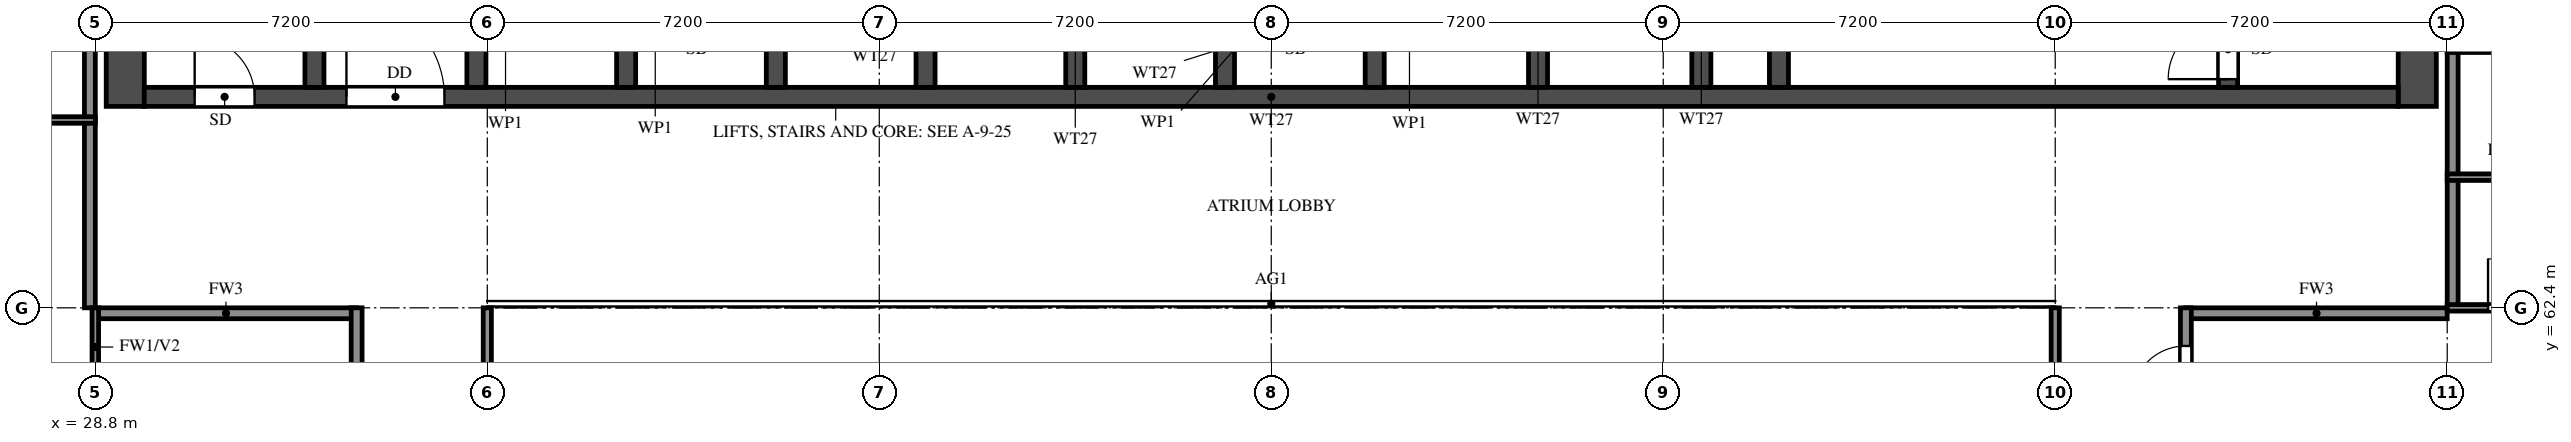
"""IFC4 building model, lengths in metres.
Left out: names, types, materials, properties, quantities, classifications, styles, units other than length and angle.
Written with IfcOpenShell. Run it as: python <this file> out.ifc"""

import sys

from ifc_helpers import new_model, si_unit, direction, frame, frame_2d, origin, place, context, subcontext, project, spatial, rectangle, extrude, element, fill, save


model = new_model("IFC4")
c1 = context("Model", 3, precision=1e-05, world=origin(), true_north=direction((0.0, 1.0)))
c2 = subcontext(c1, "Body", "Model", "MODEL_VIEW")
j1 = project(units=[si_unit("LENGTHUNIT", "METRE"), si_unit("PLANEANGLEUNIT", "RADIAN")], contexts=[c1])
p1 = place(None, origin())
s1 = spatial("IfcSite", under=j1, at=p1, CompositionType="ELEMENT")
p2 = place(p1, origin())
s2 = spatial("IfcBuilding", under=s1, at=p2, CompositionType="ELEMENT")
p3 = place(p2, frame((0.0, 0.0, 188.5)))
s3 = spatial("IfcBuildingStorey", under=s2, at=p3, CompositionType="ELEMENT", Elevation=188.5)
for number, where, z_axis, x_axis in (
    (1, (29.35, 66.1, 0.0), (0.0, 0.0, 1.0), (0.0, 1.0, 0.0)),
    (2, (71.45, 66.1, 0.0), (0.0, 0.0, 1.0), (0.0, 1.0, 0.0)),
):
    element("IfcWall", number, at=place(p3, frame(where, z_axis=z_axis, x_axis=x_axis)), inside=s3, PredefinedType="SHEAR", context=c2, shape_type="SweptSolid", body=[
        extrude(rectangle(XDim=11.9, YDim=0.7, at=frame_2d((5.95, 0.0))), origin(), (0.0, 0.0, 1.0), 3.2),
    ])
p4 = place(p3, frame((29.7, 66.275, 0.0), z_axis=(0.0, 0.0, 1.0), x_axis=(1.0, 0.0, 0.0)))
e3 = element("IfcWall", 3, at=p4, inside=s3, PredefinedType="SHEAR", context=c2, shape_type="SweptSolid", body=[
    extrude(rectangle(XDim=41.4, YDim=0.35, at=frame_2d((20.7, 0.0))), origin(), (0.0, 0.0, 1.0), 3.2),
])
p5 = place(p4, frame((0.925, 0.0, 0.0)))
e4 = element("IfcOpeningElement", 4, at=p5, cuts=e3, PredefinedType="OPENING", context=c2, shape_type="SweptSolid", body=[
    extrude(rectangle(XDim=1.1, YDim=2.1, at=frame_2d((0.55, 1.05))), frame((0.0, 0.185, 0.0), z_axis=(0.0, -1.0, 0.0), x_axis=(1.0, 0.0, 0.0)), (0.0, 0.0, 1.0), 0.37),
])
p6 = place(p4, frame((3.712, 0.0, 0.0)))
e5 = element("IfcOpeningElement", 5, at=p6, cuts=e3, PredefinedType="OPENING", context=c2, shape_type="SweptSolid", body=[
    extrude(rectangle(XDim=1.8, YDim=2.1, at=frame_2d((0.9, 1.05))), frame((0.0, 0.185, 0.0), z_axis=(0.0, -1.0, 0.0), x_axis=(1.0, 0.0, 0.0)), (0.0, 0.0, 1.0), 0.37),
])
p7 = place(p3, frame((32.825, 66.45, 0.0), z_axis=(0.0, 0.0, 1.0), x_axis=(0.0, 1.0, 0.0)))
e6 = element("IfcWall", 6, at=p7, inside=s3, PredefinedType="SHEAR", context=c2, shape_type="SweptSolid", body=[
    extrude(rectangle(XDim=10.85, YDim=0.35, at=frame_2d((5.425, 0.0))), origin(), (0.0, 0.0, 1.0), 3.2),
])
p8 = place(p3, frame((67.975, 66.45, 0.0), z_axis=(0.0, 0.0, 1.0), x_axis=(0.0, 1.0, 0.0)))
e7 = element("IfcWall", 7, at=p8, inside=s3, PredefinedType="SHEAR", context=c2, shape_type="SweptSolid", body=[
    extrude(rectangle(XDim=10.85, YDim=0.35, at=frame_2d((5.425, 0.0))), origin(), (0.0, 0.0, 1.0), 3.2),
])
p9 = place(p8, frame((0.15, 0.0, 0.0)))
e8 = element("IfcOpeningElement", 8, at=p9, cuts=e7, PredefinedType="OPENING", context=c2, shape_type="SweptSolid", body=[
    extrude(rectangle(XDim=1.1, YDim=2.1, at=frame_2d((0.55, 1.05))), frame((0.0, 0.185, 0.0), z_axis=(0.0, -1.0, 0.0), x_axis=(1.0, 0.0, 0.0)), (0.0, 0.0, 1.0), 0.37),
])
p10 = place(p3, frame((59.725, 66.45, 0.0), z_axis=(0.0, 0.0, 1.0), x_axis=(0.0, 1.0, 0.0)))
e9 = element("IfcWall", 9, at=p10, inside=s3, PredefinedType="SHEAR", context=c2, shape_type="SweptSolid", body=[
    extrude(rectangle(XDim=6.125, YDim=0.35, at=frame_2d((3.062, 0.0))), origin(), (0.0, 0.0, 1.0), 3.2),
])
p11 = place(p10, frame((3.85, 0.0, 0.0)))
e10 = element("IfcOpeningElement", 10, at=p11, cuts=e9, PredefinedType="OPENING", context=c2, shape_type="SweptSolid", body=[
    extrude(rectangle(XDim=1.2, YDim=2.1, at=frame_2d((0.6, 1.05))), frame((0.0, 0.185, 0.0), z_axis=(0.0, -1.0, 0.0), x_axis=(1.0, 0.0, 0.0)), (0.0, 0.0, 1.0), 0.37),
])
for number, where, z_axis, x_axis in (
    (11, (35.8, 66.45, 0.0), (0.0, 0.0, 1.0), (0.0, 1.0, 0.0)),
    (12, (38.55, 66.45, 0.0), (0.0, 0.0, 1.0), (0.0, 1.0, 0.0)),
    (13, (41.3, 66.45, 0.0), (0.0, 0.0, 1.0), (0.0, 1.0, 0.0)),
    (14, (44.05, 66.45, 0.0), (0.0, 0.0, 1.0), (0.0, 1.0, 0.0)),
    (15, (46.8, 66.45, 0.0), (0.0, 0.0, 1.0), (0.0, 1.0, 0.0)),
    (16, (49.55, 66.45, 0.0), (0.0, 0.0, 1.0), (0.0, 1.0, 0.0)),
    (17, (52.3, 66.45, 0.0), (0.0, 0.0, 1.0), (0.0, 1.0, 0.0)),
    (18, (55.3, 66.45, 0.0), (0.0, 0.0, 1.0), (0.0, 1.0, 0.0)),
    (19, (58.3, 66.45, 0.0), (0.0, 0.0, 1.0), (0.0, 1.0, 0.0)),
):
    element("IfcWall", number, at=place(p3, frame(where, z_axis=z_axis, x_axis=x_axis)), inside=s3, PredefinedType="SHEAR", context=c2, shape_type="SweptSolid", body=[
        extrude(rectangle(XDim=2.425, YDim=0.35, at=frame_2d((1.212, 0.0))), origin(), (0.0, 0.0, 1.0), 3.2),
    ])
for number, where, z_axis, x_axis in (
    (20, (28.8, 62.3, 0.0), (0.0, 0.0, 1.0), (1.0, 0.0, 0.0)),
    (21, (67.2, 62.3, 0.0), (0.0, 0.0, 1.0), (1.0, 0.0, 0.0)),
):
    element("IfcWall", number, at=place(p3, frame(where, z_axis=z_axis, x_axis=x_axis)), inside=s3, PredefinedType="SOLIDWALL", context=c2, shape_type="SweptSolid", body=[
        extrude(rectangle(XDim=4.8, YDim=0.2, at=frame_2d((2.4, 0.0))), origin(), (0.0, 0.0, 1.0), 3.2),
    ])
p12 = place(p3, frame((28.7, 62.4, 0.0), z_axis=(0.0, 0.0, 1.0), x_axis=(0.0, 1.0, 0.0)))
e22 = element("IfcWall", 22, at=p12, inside=s3, PredefinedType="SOLIDWALL", context=c2, shape_type="SweptSolid", body=[
    extrude(rectangle(XDim=15.6, YDim=0.2, at=frame_2d((7.8, 0.0))), origin(), (0.0, 0.0, 1.0), 3.2),
])
p13 = place(p3, frame((33.6, 56.4, 0.0), z_axis=(0.0, 0.0, 1.0), x_axis=(0.0, 1.0, 0.0)))
e23 = element("IfcWall", 23, at=p13, inside=s3, PredefinedType="SOLIDWALL", context=c2, shape_type="SweptSolid", body=[
    extrude(rectangle(XDim=6.0, YDim=0.2, at=frame_2d((3.0, 0.0))), origin(), (0.0, 0.0, 1.0), 3.2),
])
p14 = place(p13, frame((3.7, 0.0, 0.0)))
e24 = element("IfcOpeningElement", 24, at=p14, cuts=e23, PredefinedType="OPENING", context=c2, shape_type="SweptSolid", body=[
    extrude(rectangle(XDim=1.0, YDim=2.1, at=frame_2d((0.5, 1.05))), frame((0.0, 0.11, 0.0), z_axis=(0.0, -1.0, 0.0), x_axis=(1.0, 0.0, 0.0)), (0.0, 0.0, 1.0), 0.22),
])
p15 = place(p3, frame((67.2, 45.6, 0.0), z_axis=(0.0, 0.0, 1.0), x_axis=(0.0, 1.0, 0.0)))
e25 = element("IfcWall", 25, at=p15, inside=s3, PredefinedType="SOLIDWALL", context=c2, shape_type="SweptSolid", body=[
    extrude(rectangle(XDim=16.8, YDim=0.2, at=frame_2d((8.4, 0.0))), origin(), (0.0, 0.0, 1.0), 3.2),
])
p16 = place(p15, frame((8.3, 0.0, 0.0)))
e26 = element("IfcOpeningElement", 26, at=p16, cuts=e25, PredefinedType="OPENING", context=c2, shape_type="SweptSolid", body=[
    extrude(rectangle(XDim=1.0, YDim=2.1, at=frame_2d((0.5, 1.05))), frame((0.0, 0.11, 0.0), z_axis=(0.0, -1.0, 0.0), x_axis=(1.0, 0.0, 0.0)), (0.0, 0.0, 1.0), 0.22),
])
p17 = place(p15, frame((15.1, 0.0, 0.0)))
e27 = element("IfcOpeningElement", 27, at=p17, cuts=e25, PredefinedType="OPENING", context=c2, shape_type="SweptSolid", body=[
    extrude(rectangle(XDim=1.0, YDim=2.1, at=frame_2d((0.5, 1.05))), frame((0.0, 0.11, 0.0), z_axis=(0.0, -1.0, 0.0), x_axis=(1.0, 0.0, 0.0)), (0.0, 0.0, 1.0), 0.22),
])
p18 = place(p15, frame((0.7, 0.0, 0.0)))
e28 = element("IfcOpeningElement", 28, at=p18, cuts=e25, PredefinedType="OPENING", context=c2, shape_type="SweptSolid", body=[
    extrude(rectangle(XDim=1.0, YDim=2.1, at=frame_2d((0.5, 1.05))), frame((0.0, 0.11, 0.0), z_axis=(0.0, -1.0, 0.0), x_axis=(1.0, 0.0, 0.0)), (0.0, 0.0, 1.0), 0.22),
])
p19 = place(p3, frame((72.1, 62.4, 0.0), z_axis=(0.0, 0.0, 1.0), x_axis=(0.0, 1.0, 0.0)))
e29 = element("IfcWall", 29, at=p19, inside=s3, PredefinedType="SOLIDWALL", context=c2, shape_type="SweptSolid", body=[
    extrude(rectangle(XDim=15.6, YDim=0.2, at=frame_2d((7.8, 0.0))), origin(), (0.0, 0.0, 1.0), 3.2),
])
p20 = place(p3, frame((72.0, 62.4, 0.0), z_axis=(0.0, 0.0, 1.0), x_axis=(1.0, 0.0, 0.0)))
e30 = element("IfcWall", 30, at=p20, inside=s3, PredefinedType="PARTITIONING", context=c2, shape_type="SweptSolid", body=[
    extrude(rectangle(XDim=2.4, YDim=0.12, at=frame_2d((1.2, 0.0))), origin(), (0.0, 0.0, 1.0), 3.2),
])
p21 = place(p20, frame((0.75, 0.0, 0.0)))
e31 = element("IfcOpeningElement", 31, at=p21, cuts=e30, PredefinedType="OPENING", context=c2, shape_type="SweptSolid", body=[
    extrude(rectangle(XDim=0.9, YDim=2.1, at=frame_2d((0.45, 1.05))), frame((0.0, 0.07, 0.0), z_axis=(0.0, -1.0, 0.0), x_axis=(1.0, 0.0, 0.0)), (0.0, 0.0, 1.0), 0.14),
])
p22 = place(p3, frame((72.0, 64.8, 0.0), z_axis=(0.0, 0.0, 1.0), x_axis=(1.0, 0.0, 0.0)))
e32 = element("IfcWall", 32, at=p22, inside=s3, PredefinedType="PARTITIONING", context=c2, shape_type="SweptSolid", body=[
    extrude(rectangle(XDim=5.1, YDim=0.12, at=frame_2d((2.55, 0.0))), origin(), (0.0, 0.0, 1.0), 3.2),
])
p23 = place(p22, frame((2.15, 0.0, 0.0)))
e33 = element("IfcOpeningElement", 33, at=p23, cuts=e32, PredefinedType="OPENING", context=c2, shape_type="SweptSolid", body=[
    extrude(rectangle(XDim=0.8, YDim=2.1, at=frame_2d((0.4, 1.05))), frame((0.0, 0.07, 0.0), z_axis=(0.0, -1.0, 0.0), x_axis=(1.0, 0.0, 0.0)), (0.0, 0.0, 1.0), 0.14),
])
for number, where, z_axis, x_axis in (
    (34, (23.7, 65.85, 0.0), (0.0, 0.0, 1.0), (1.0, 0.0, 0.0)),
    (35, (72.0, 67.15, 0.0), (0.0, 0.0, 1.0), (1.0, 0.0, 0.0)),
):
    element("IfcWall", number, at=place(p3, frame(where, z_axis=z_axis, x_axis=x_axis)), inside=s3, PredefinedType="PARTITIONING", context=c2, shape_type="SweptSolid", body=[
        extrude(rectangle(XDim=5.1, YDim=0.12, at=frame_2d((2.55, 0.0))), origin(), (0.0, 0.0, 1.0), 3.2),
    ])
p24 = place(p3, frame((28.8, 58.8, 0.0), z_axis=(0.0, 0.0, 1.0), x_axis=(0.0, 1.0, 0.0)))
e36 = element("IfcWall", 36, at=p24, inside=s3, PredefinedType="PARTITIONING", context=c2, shape_type="SweptSolid", body=[
    extrude(rectangle(XDim=3.6, YDim=0.12, at=frame_2d((1.8, 0.0))), origin(), (0.0, 0.0, 1.0), 3.2),
])
p25 = place(p24, frame((0.75, 0.0, 0.0)))
e37 = element("IfcOpeningElement", 37, at=p25, cuts=e36, PredefinedType="OPENING", context=c2, shape_type="SweptSolid", body=[
    extrude(rectangle(XDim=0.9, YDim=2.1, at=frame_2d((0.45, 1.05))), frame((0.0, 0.07, 0.0), z_axis=(0.0, -1.0, 0.0), x_axis=(1.0, 0.0, 0.0)), (0.0, 0.0, 1.0), 0.14),
])
for number, where, z_axis, x_axis in (
    (38, (36.0, 48.0, 0.0), (0.0, 0.0, 1.0), (0.0, 1.0, 0.0)),
    (39, (64.8, 48.0, 0.0), (0.0, 0.0, 1.0), (0.0, 1.0, 0.0)),
):
    element("IfcWall", number, at=place(p3, frame(where, z_axis=z_axis, x_axis=x_axis)), inside=s3, PredefinedType="SOLIDWALL", context=c2, shape_type="SweptSolid", body=[
        extrude(rectangle(XDim=14.4, YDim=0.15, at=frame_2d((7.2, 0.0))), origin(), (0.0, 0.0, 1.0), 2.3),
    ])
p26 = place(p5, origin())
e40 = element("IfcDoor", 40, at=p26, inside=s3, OperationType="SINGLE_SWING_LEFT", PredefinedType="DOOR", context=c2, shape_type="SweptSolid", body=[
    extrude(rectangle(XDim=1.1, YDim=2.1, at=frame_2d((0.55, 1.05))), frame((0.0, 0.025, 0.0), z_axis=(0.0, -1.0, 0.0), x_axis=(1.0, 0.0, 0.0)), (0.0, 0.0, 1.0), 0.05),
])
fill(e4, e40)
p27 = place(p9, origin())
e41 = element("IfcDoor", 41, at=p27, inside=s3, OperationType="SINGLE_SWING_LEFT", PredefinedType="DOOR", context=c2, shape_type="SweptSolid", body=[
    extrude(rectangle(XDim=1.1, YDim=2.1, at=frame_2d((0.55, 1.05))), frame((0.0, 0.025, 0.0), z_axis=(0.0, -1.0, 0.0), x_axis=(1.0, 0.0, 0.0)), (0.0, 0.0, 1.0), 0.05),
])
fill(e8, e41)
p28 = place(p6, origin())
e42 = element("IfcDoor", 42, at=p28, inside=s3, OperationType="DOUBLE_DOOR_SINGLE_SWING", PredefinedType="DOOR", context=c2, shape_type="SweptSolid", body=[
    extrude(rectangle(XDim=1.8, YDim=2.1, at=frame_2d((0.9, 1.05))), frame((0.0, 0.025, 0.0), z_axis=(0.0, -1.0, 0.0), x_axis=(1.0, 0.0, 0.0)), (0.0, 0.0, 1.0), 0.05),
])
fill(e5, e42)
p29 = place(p21, origin())
e43 = element("IfcDoor", 43, at=p29, inside=s3, OperationType="SINGLE_SWING_LEFT", PredefinedType="DOOR", context=c2, shape_type="SweptSolid", body=[
    extrude(rectangle(XDim=0.9, YDim=2.1, at=frame_2d((0.45, 1.05))), frame((0.0, 0.025, 0.0), z_axis=(0.0, -1.0, 0.0), x_axis=(1.0, 0.0, 0.0)), (0.0, 0.0, 1.0), 0.05),
])
fill(e31, e43)
p30 = place(p17, origin())
e44 = element("IfcDoor", 44, at=p30, inside=s3, OperationType="SINGLE_SWING_RIGHT", PredefinedType="DOOR", context=c2, shape_type="SweptSolid", body=[
    extrude(rectangle(XDim=1.0, YDim=2.1, at=frame_2d((0.5, 1.05))), frame((0.0, 0.025, 0.0), z_axis=(0.0, -1.0, 0.0), x_axis=(1.0, 0.0, 0.0)), (0.0, 0.0, 1.0), 0.05),
])
fill(e27, e44)
save(model, sys.argv[1])
